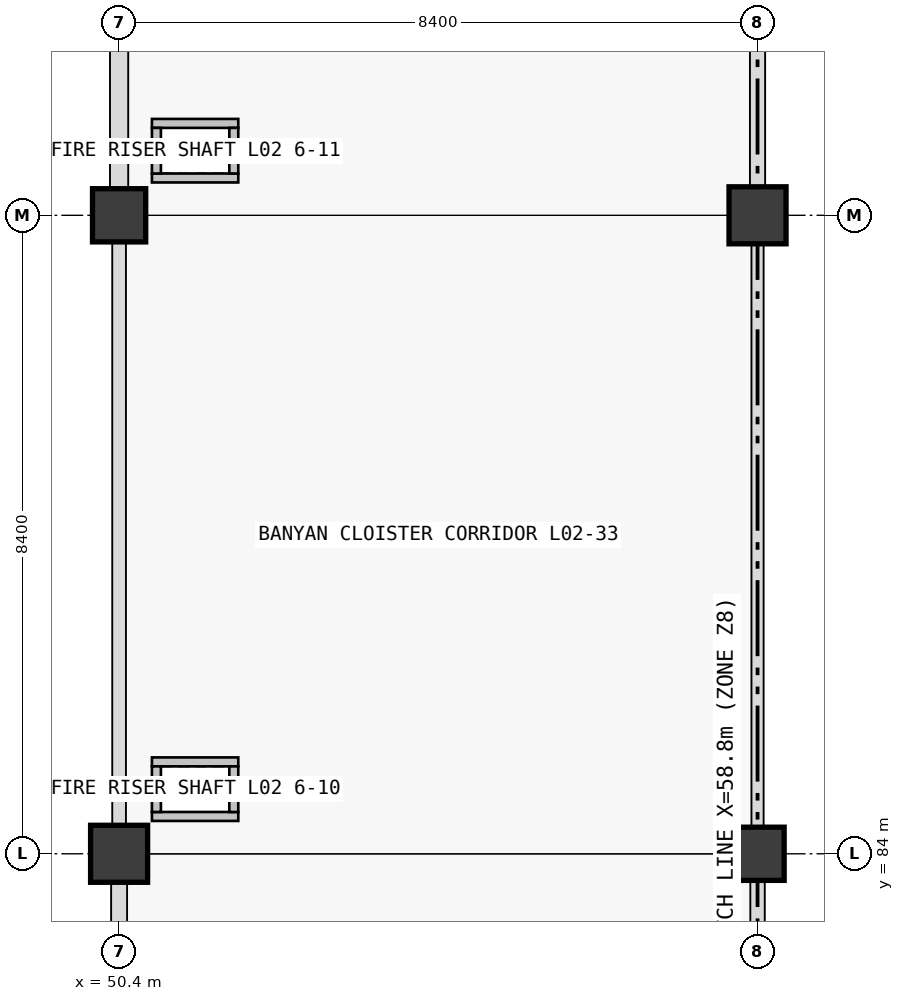
"""IFC4 building model, lengths in metres.
Left out: names, types, materials, properties, quantities, classifications, styles, units other than length and angle.
Written with IfcOpenShell. Run it as: python <this file> out.ifc"""

import sys

from ifc_helpers import new_model, si_unit, direction, frame, frame_2d, origin, origin_2d, place, context, subcontext, project, spatial, rectangle, extrude, element, save


model = new_model("IFC4")
c1 = context("Model", 3, precision=1e-05, world=origin(), true_north=direction((0.0, 1.0)))
c2 = subcontext(c1, "Body", "Model", "MODEL_VIEW")
j1 = project(units=[si_unit("LENGTHUNIT", "METRE"), si_unit("PLANEANGLEUNIT", "RADIAN")], contexts=[c1])
p1 = place(None, origin())
s1 = spatial("IfcSite", under=j1, at=p1, CompositionType="ELEMENT")
p2 = place(p1, origin())
s2 = spatial("IfcBuilding", under=s1, at=p2, CompositionType="ELEMENT")
p3 = place(p2, frame((0.0, 0.0, 10.26)))
s3 = spatial("IfcBuildingStorey", under=s2, at=p3, CompositionType="ELEMENT", Elevation=10.26)
p4 = place(p3, frame((50.4, 84.0, 0.0), z_axis=(0.0, 0.0, 1.0), x_axis=(1.0, 0.0, 0.0)))
e1 = element("IfcColumn", 1, at=p4, inside=s3, PredefinedType="COLUMN", context=c2, shape_type="SweptSolid", body=[
    extrude(rectangle(XDim=0.75, YDim=0.75, at=origin_2d()), origin(), (0.0, 0.0, 1.0), 4.5),
])
for number, where, z_axis, x_axis in (
    (2, (50.4, 92.4, 0.0), (0.0, 0.0, 1.0), (1.0, 0.0, 0.0)),
    (3, (58.8, 84.0, 0.0), (0.0, 0.0, 1.0), (1.0, 0.0, 0.0)),
):
    element("IfcColumn", number, at=place(p3, frame(where, z_axis=z_axis, x_axis=x_axis)), inside=s3, PredefinedType="COLUMN", context=c2, shape_type="SweptSolid", body=[
        extrude(rectangle(XDim=0.7, YDim=0.7, at=origin_2d()), origin(), (0.0, 0.0, 1.0), 4.5),
    ])
p5 = place(p3, frame((58.8, 92.4, 0.0), z_axis=(0.0, 0.0, 1.0), x_axis=(1.0, 0.0, 0.0)))
e4 = element("IfcColumn", 4, at=p5, inside=s3, PredefinedType="COLUMN", context=c2, shape_type="SweptSolid", body=[
    extrude(rectangle(XDim=0.75, YDim=0.75, at=origin_2d()), origin(), (0.0, 0.0, 1.0), 4.5),
])
for number, where, z_axis, x_axis in (
    (5, (50.832, 84.491, 0.0), (0.0, 0.0, 1.0), (1.0, 0.0, 0.0)),
    (6, (50.832, 85.209, 0.0), (0.0, 0.0, 1.0), (1.0, 0.0, 0.0)),
):
    element("IfcWall", number, at=place(p3, frame(where, z_axis=z_axis, x_axis=x_axis)), inside=s3, PredefinedType="PARTITIONING", context=c2, shape_type="SweptSolid", body=[
        extrude(rectangle(XDim=1.136, YDim=0.118, at=frame_2d((0.568, 0.0))), origin(), (0.0, 0.0, 1.0), 3.53),
    ])
for number, where, z_axis, x_axis in (
    (7, (50.891, 84.55, 0.0), (0.0, 0.0, 1.0), (0.0, 1.0, 0.0)),
    (8, (51.909, 84.55, 0.0), (0.0, 0.0, 1.0), (0.0, 1.0, 0.0)),
):
    element("IfcWall", number, at=place(p3, frame(where, z_axis=z_axis, x_axis=x_axis)), inside=s3, PredefinedType="PARTITIONING", context=c2, shape_type="SweptSolid", body=[
        extrude(rectangle(XDim=0.6, YDim=0.118, at=frame_2d((0.3, 0.0))), origin(), (0.0, 0.0, 1.0), 3.53),
    ])
for number, where, z_axis, x_axis in (
    (9, (50.832, 92.891, 0.0), (0.0, 0.0, 1.0), (1.0, 0.0, 0.0)),
    (10, (50.832, 93.609, 0.0), (0.0, 0.0, 1.0), (1.0, 0.0, 0.0)),
):
    element("IfcWall", number, at=place(p3, frame(where, z_axis=z_axis, x_axis=x_axis)), inside=s3, PredefinedType="PARTITIONING", context=c2, shape_type="SweptSolid", body=[
        extrude(rectangle(XDim=1.136, YDim=0.118, at=frame_2d((0.568, 0.0))), origin(), (0.0, 0.0, 1.0), 3.53),
    ])
for number, where, z_axis, x_axis in (
    (11, (50.891, 92.95, 0.0), (0.0, 0.0, 1.0), (0.0, 1.0, 0.0)),
    (12, (51.909, 92.95, 0.0), (0.0, 0.0, 1.0), (0.0, 1.0, 0.0)),
):
    element("IfcWall", number, at=place(p3, frame(where, z_axis=z_axis, x_axis=x_axis)), inside=s3, PredefinedType="PARTITIONING", context=c2, shape_type="SweptSolid", body=[
        extrude(rectangle(XDim=0.6, YDim=0.118, at=frame_2d((0.3, 0.0))), origin(), (0.0, 0.0, 1.0), 3.53),
    ])
save(model, sys.argv[1])
